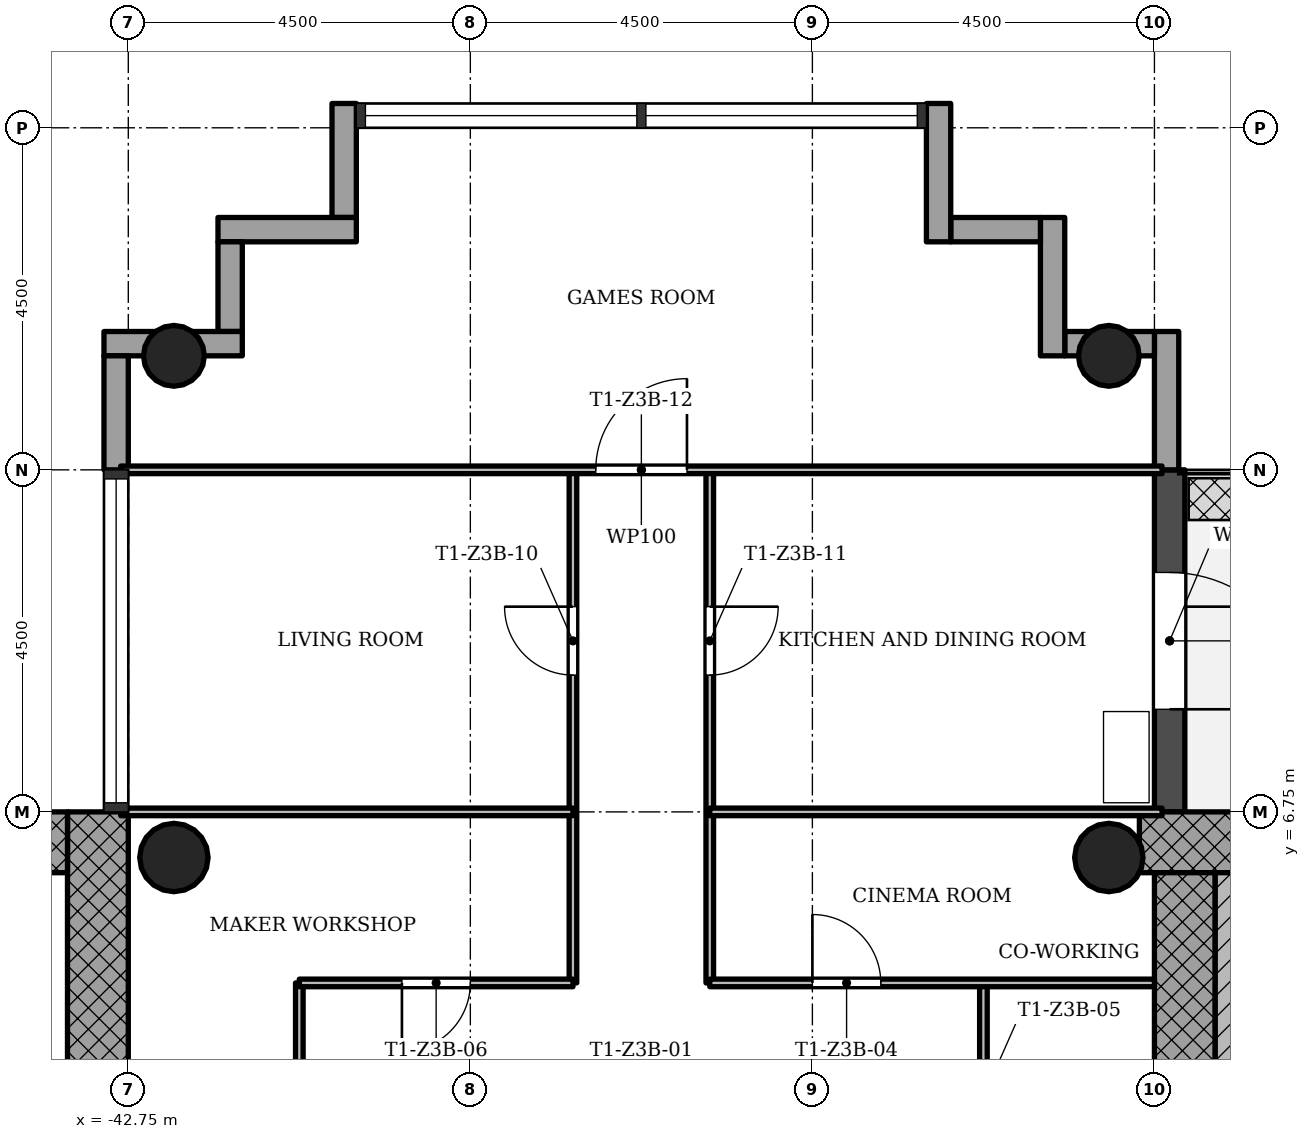
"""IFC4 building model, lengths in metres.
Left out: names, types, materials, properties, quantities, classifications, styles, units other than length and angle.
Written with IfcOpenShell. Run it as: python <this file> out.ifc"""

import sys

from ifc_helpers import new_model, si_unit, direction, frame, frame_2d, origin, origin_2d, place, context, subcontext, project, spatial, rectangle, hollow_circle, extrude, element, fill, save


model = new_model("IFC4")
c1 = context("Model", 3, precision=1e-05, world=origin(), true_north=direction((0.0, 1.0)))
c2 = subcontext(c1, "Body", "Model", "MODEL_VIEW")
j1 = project(units=[si_unit("LENGTHUNIT", "METRE"), si_unit("PLANEANGLEUNIT", "RADIAN")], contexts=[c1])
p1 = place(None, origin())
s1 = spatial("IfcSite", under=j1, at=p1, CompositionType="ELEMENT")
p2 = place(p1, origin())
s2 = spatial("IfcBuilding", under=s1, at=p2, CompositionType="ELEMENT")
p3 = place(p2, frame((0.0, 0.0, 147.3)))
s3 = spatial("IfcBuildingStorey", under=s2, at=p3, CompositionType="ELEMENT", Elevation=147.3)
p4 = place(p3, frame((-20.652, 6.35, 0.0), z_axis=(0.0, 0.0, 1.0), x_axis=(-1.0, 0.0, 0.0)))
e1 = element("IfcWall", 1, at=p4, inside=s3, PredefinedType="SHEAR", context=c2, shape_type="SweptSolid", body=[
    extrude(rectangle(XDim=8.796, YDim=0.8, at=frame_2d((4.398, 0.0))), origin(), (0.0, 0.0, 1.0), 3.4),
])
p5 = place(p3, frame((-28.85, 5.95, 0.0), z_axis=(0.0, 0.0, 1.0), x_axis=(0.0, -1.0, 0.0)))
e2 = element("IfcWall", 2, at=p5, inside=s3, PredefinedType="SHEAR", context=c2, shape_type="SweptSolid", body=[
    extrude(rectangle(XDim=12.7, YDim=0.8, at=frame_2d((6.35, 0.0))), origin(), (0.0, 0.0, 1.0), 3.4),
])
p6 = place(p5, frame((5.05, 0.0, 0.0)))
e3 = element("IfcOpeningElement", 3, at=p6, cuts=e2, PredefinedType="OPENING", context=c2, shape_type="SweptSolid", body=[
    extrude(rectangle(XDim=1.8, YDim=2.1, at=frame_2d((0.9, 1.05))), frame((0.0, 0.41, 0.0), z_axis=(0.0, -1.0, 0.0), x_axis=(1.0, 0.0, 0.0)), (0.0, 0.0, 1.0), 0.82),
])
p7 = place(p3, frame((-43.15, -5.95, 0.0), z_axis=(0.0, 0.0, 1.0), x_axis=(0.0, 1.0, 0.0)))
e4 = element("IfcWall", 4, at=p7, inside=s3, PredefinedType="SHEAR", context=c2, shape_type="SweptSolid", body=[
    extrude(rectangle(XDim=12.7, YDim=0.8, at=frame_2d((6.35, 0.0))), origin(), (0.0, 0.0, 1.0), 3.4),
])
p8 = place(p7, frame((5.05, 0.0, 0.0)))
e5 = element("IfcOpeningElement", 5, at=p8, cuts=e4, PredefinedType="OPENING", context=c2, shape_type="SweptSolid", body=[
    extrude(rectangle(XDim=1.8, YDim=2.1, at=frame_2d((0.9, 1.05))), frame((0.0, 0.41, 0.0), z_axis=(0.0, -1.0, 0.0), x_axis=(1.0, 0.0, 0.0)), (0.0, 0.0, 1.0), 0.82),
])
p9 = place(p3, frame((-43.55, 6.35, 0.0), z_axis=(0.0, 0.0, 1.0), x_axis=(-1.0, 0.0, 0.0)))
e6 = element("IfcWall", 6, at=p9, inside=s3, PredefinedType="SHEAR", context=c2, shape_type="SweptSolid", body=[
    extrude(rectangle(XDim=8.2, YDim=0.8, at=frame_2d((4.1, 0.0))), origin(), (0.0, 0.0, 1.0), 3.4),
])
for number, where, z_axis, x_axis in (
    (7, (-29.85, 12.75, 0.0), (0.0, 0.0, 1.0), (1.0, 0.0, 0.0)),
    (8, (-42.15, 12.75, 0.0), (0.0, 0.0, 1.0), (1.0, 0.0, 0.0)),
):
    element("IfcColumn", number, at=place(p3, frame(where, z_axis=z_axis, x_axis=x_axis)), inside=s3, PredefinedType="COLUMN", context=c2, shape_type="SweptSolid", body=[
        extrude(hollow_circle(Radius=0.4, WallThickness=0.028, at=origin_2d()), origin(), (0.0, 0.0, 1.0), 3.4),
    ])
for number, where, z_axis, x_axis in (
    (9, (-29.85, 6.15, 0.0), (0.0, 0.0, 1.0), (1.0, 0.0, 0.0)),
    (10, (-42.15, 6.15, 0.0), (0.0, 0.0, 1.0), (1.0, 0.0, 0.0)),
):
    element("IfcColumn", number, at=place(p3, frame(where, z_axis=z_axis, x_axis=x_axis)), inside=s3, PredefinedType="COLUMN", context=c2, shape_type="SweptSolid", body=[
        extrude(hollow_circle(Radius=0.45, WallThickness=0.032, at=origin_2d()), origin(), (0.0, 0.0, 1.0), 3.4),
    ])
p10 = place(p3, frame((-29.05, 6.75, -0.02), z_axis=(0.0, 0.0, 1.0), x_axis=(0.0, 1.0, 0.0)))
e11 = element("IfcWall", 11, at=p10, inside=s3, PredefinedType="STANDARD", context=c2, shape_type="SweptSolid", body=[
    extrude(rectangle(XDim=4.5, YDim=0.4, at=frame_2d((2.25, 0.0))), origin(), (0.0, 0.0, 1.0), 3.12),
])
p11 = place(p10, frame((1.35, 0.0, 0.02)))
e12 = element("IfcOpeningElement", 12, at=p11, cuts=e11, PredefinedType="OPENING", context=c2, shape_type="SweptSolid", body=[
    extrude(rectangle(XDim=1.8, YDim=2.1, at=frame_2d((0.9, 1.05))), frame((0.0, 0.21, 0.0), z_axis=(0.0, -1.0, 0.0), x_axis=(1.0, 0.0, 0.0)), (0.0, 0.0, 1.0), 0.42),
])
p12 = place(p3, frame((-29.09, 11.25, -0.3), z_axis=(0.0, 0.0, 1.0), x_axis=(0.0, 1.0, 0.0)))
e13 = element("IfcWall", 13, at=p12, inside=s3, PredefinedType="STANDARD", context=c2, shape_type="SweptSolid", body=[
    extrude(rectangle(XDim=1.82, YDim=0.32, at=frame_2d((0.91, 0.0))), origin(), (0.0, 0.0, 1.0), 3.4),
])
p13 = place(p3, frame((-29.25, 12.91, -0.3), z_axis=(0.0, 0.0, 1.0), x_axis=(-1.0, 0.0, 0.0)))
e14 = element("IfcWall", 14, at=p13, inside=s3, PredefinedType="STANDARD", context=c2, shape_type="SweptSolid", body=[
    extrude(rectangle(XDim=1.18, YDim=0.32, at=frame_2d((0.59, 0.0))), origin(), (0.0, 0.0, 1.0), 3.4),
])
p14 = place(p3, frame((-30.59, 12.75, -0.3), z_axis=(0.0, 0.0, 1.0), x_axis=(0.0, 1.0, 0.0)))
e15 = element("IfcWall", 15, at=p14, inside=s3, PredefinedType="STANDARD", context=c2, shape_type="SweptSolid", body=[
    extrude(rectangle(XDim=1.82, YDim=0.32, at=frame_2d((0.91, 0.0))), origin(), (0.0, 0.0, 1.0), 3.4),
])
p15 = place(p3, frame((-30.75, 14.41, -0.3), z_axis=(0.0, 0.0, 1.0), x_axis=(-1.0, 0.0, 0.0)))
e16 = element("IfcWall", 16, at=p15, inside=s3, PredefinedType="STANDARD", context=c2, shape_type="SweptSolid", body=[
    extrude(rectangle(XDim=1.18, YDim=0.32, at=frame_2d((0.59, 0.0))), origin(), (0.0, 0.0, 1.0), 3.4),
])
p16 = place(p3, frame((-32.09, 14.25, -0.3), z_axis=(0.0, 0.0, 1.0), x_axis=(0.0, 1.0, 0.0)))
e17 = element("IfcWall", 17, at=p16, inside=s3, PredefinedType="STANDARD", context=c2, shape_type="SweptSolid", body=[
    extrude(rectangle(XDim=1.82, YDim=0.32, at=frame_2d((0.91, 0.0))), origin(), (0.0, 0.0, 1.0), 3.4),
])
p17 = place(p3, frame((-39.91, 16.07, -0.3), z_axis=(0.0, 0.0, 1.0), x_axis=(0.0, -1.0, 0.0)))
e18 = element("IfcWall", 18, at=p17, inside=s3, PredefinedType="STANDARD", context=c2, shape_type="SweptSolid", body=[
    extrude(rectangle(XDim=1.5, YDim=0.32, at=frame_2d((0.75, 0.0))), origin(), (0.0, 0.0, 1.0), 3.4),
])
p18 = place(p3, frame((-39.75, 14.41, -0.3), z_axis=(0.0, 0.0, 1.0), x_axis=(-1.0, 0.0, 0.0)))
e19 = element("IfcWall", 19, at=p18, inside=s3, PredefinedType="STANDARD", context=c2, shape_type="SweptSolid", body=[
    extrude(rectangle(XDim=1.82, YDim=0.32, at=frame_2d((0.91, 0.0))), origin(), (0.0, 0.0, 1.0), 3.4),
])
p19 = place(p3, frame((-41.41, 14.25, -0.3), z_axis=(0.0, 0.0, 1.0), x_axis=(0.0, -1.0, 0.0)))
e20 = element("IfcWall", 20, at=p19, inside=s3, PredefinedType="STANDARD", context=c2, shape_type="SweptSolid", body=[
    extrude(rectangle(XDim=1.18, YDim=0.32, at=frame_2d((0.59, 0.0))), origin(), (0.0, 0.0, 1.0), 3.4),
])
p20 = place(p3, frame((-41.25, 12.91, -0.3), z_axis=(0.0, 0.0, 1.0), x_axis=(-1.0, 0.0, 0.0)))
e21 = element("IfcWall", 21, at=p20, inside=s3, PredefinedType="STANDARD", context=c2, shape_type="SweptSolid", body=[
    extrude(rectangle(XDim=1.82, YDim=0.32, at=frame_2d((0.91, 0.0))), origin(), (0.0, 0.0, 1.0), 3.4),
])
p21 = place(p3, frame((-42.91, 12.75, -0.3), z_axis=(0.0, 0.0, 1.0), x_axis=(0.0, -1.0, 0.0)))
e22 = element("IfcWall", 22, at=p21, inside=s3, PredefinedType="STANDARD", context=c2, shape_type="SweptSolid", body=[
    extrude(rectangle(XDim=1.5, YDim=0.32, at=frame_2d((0.75, 0.0))), origin(), (0.0, 0.0, 1.0), 3.4),
])
p22 = place(p3, frame((-40.5, 1.5, 0.0), z_axis=(0.0, 0.0, 1.0), x_axis=(0.0, 1.0, 0.0)))
e23 = element("IfcWall", 23, at=p22, inside=s3, PredefinedType="PARTITIONING", context=c2, shape_type="SweptSolid", body=[
    extrude(rectangle(XDim=3.0, YDim=0.1, at=frame_2d((1.5, 0.0))), origin(), (0.0, 0.0, 1.0), 3.0),
])
p23 = place(p3, frame((-36.9, 4.5, 0.0), z_axis=(0.0, 0.0, 1.0), x_axis=(0.0, 1.0, 0.0)))
e24 = element("IfcWall", 24, at=p23, inside=s3, PredefinedType="PARTITIONING", context=c2, shape_type="SweptSolid", body=[
    extrude(rectangle(XDim=6.75, YDim=0.1, at=frame_2d((3.375, 0.0))), origin(), (0.0, 0.0, 1.0), 3.0),
])
p24 = place(p23, frame((4.05, 0.0, 0.0)))
e25 = element("IfcOpeningElement", 25, at=p24, cuts=e24, PredefinedType="OPENING", context=c2, shape_type="SweptSolid", body=[
    extrude(rectangle(XDim=0.9, YDim=2.1, at=frame_2d((0.45, 1.05))), frame((0.0, 0.06, 0.0), z_axis=(0.0, -1.0, 0.0), x_axis=(1.0, 0.0, 0.0)), (0.0, 0.0, 1.0), 0.12),
])
p25 = place(p3, frame((-35.1, 4.5, 0.0), z_axis=(0.0, 0.0, 1.0), x_axis=(0.0, 1.0, 0.0)))
e26 = element("IfcWall", 26, at=p25, inside=s3, PredefinedType="PARTITIONING", context=c2, shape_type="SweptSolid", body=[
    extrude(rectangle(XDim=6.75, YDim=0.1, at=frame_2d((3.375, 0.0))), origin(), (0.0, 0.0, 1.0), 3.0),
])
p26 = place(p25, frame((4.05, 0.0, 0.0)))
e27 = element("IfcOpeningElement", 27, at=p26, cuts=e26, PredefinedType="OPENING", context=c2, shape_type="SweptSolid", body=[
    extrude(rectangle(XDim=0.9, YDim=2.1, at=frame_2d((0.45, 1.05))), frame((0.0, 0.06, 0.0), z_axis=(0.0, -1.0, 0.0), x_axis=(1.0, 0.0, 0.0)), (0.0, 0.0, 1.0), 0.12),
])
p27 = place(p3, frame((-31.5, 1.5, 0.0), z_axis=(0.0, 0.0, 1.0), x_axis=(0.0, 1.0, 0.0)))
e28 = element("IfcWall", 28, at=p27, inside=s3, PredefinedType="PARTITIONING", context=c2, shape_type="SweptSolid", body=[
    extrude(rectangle(XDim=3.0, YDim=0.1, at=frame_2d((1.5, 0.0))), origin(), (0.0, 0.0, 1.0), 3.0),
])
p28 = place(p27, frame((1.05, 0.0, 0.0)))
e29 = element("IfcOpeningElement", 29, at=p28, cuts=e28, PredefinedType="OPENING", context=c2, shape_type="SweptSolid", body=[
    extrude(rectangle(XDim=0.9, YDim=2.1, at=frame_2d((0.45, 1.05))), frame((0.0, 0.06, 0.0), z_axis=(0.0, -1.0, 0.0), x_axis=(1.0, 0.0, 0.0)), (0.0, 0.0, 1.0), 0.12),
])
p29 = place(p3, frame((-40.5, 4.5, 0.0), z_axis=(0.0, 0.0, 1.0), x_axis=(1.0, 0.0, 0.0)))
e30 = element("IfcWall", 30, at=p29, inside=s3, PredefinedType="PARTITIONING", context=c2, shape_type="SweptSolid", body=[
    extrude(rectangle(XDim=3.6, YDim=0.1, at=frame_2d((1.8, 0.0))), origin(), (0.0, 0.0, 1.0), 3.0),
])
p30 = place(p29, frame((1.35, 0.0, 0.0)))
e31 = element("IfcOpeningElement", 31, at=p30, cuts=e30, PredefinedType="OPENING", context=c2, shape_type="SweptSolid", body=[
    extrude(rectangle(XDim=0.9, YDim=2.1, at=frame_2d((0.45, 1.05))), frame((0.0, 0.06, 0.0), z_axis=(0.0, -1.0, 0.0), x_axis=(1.0, 0.0, 0.0)), (0.0, 0.0, 1.0), 0.12),
])
p31 = place(p3, frame((-35.1, 4.5, 0.0), z_axis=(0.0, 0.0, 1.0), x_axis=(1.0, 0.0, 0.0)))
e32 = element("IfcWall", 32, at=p31, inside=s3, PredefinedType="PARTITIONING", context=c2, shape_type="SweptSolid", body=[
    extrude(rectangle(XDim=5.85, YDim=0.1, at=frame_2d((2.925, 0.0))), origin(), (0.0, 0.0, 1.0), 3.0),
])
p32 = place(p31, frame((1.35, 0.0, 0.0)))
e33 = element("IfcOpeningElement", 33, at=p32, cuts=e32, PredefinedType="OPENING", context=c2, shape_type="SweptSolid", body=[
    extrude(rectangle(XDim=0.9, YDim=2.1, at=frame_2d((0.45, 1.05))), frame((0.0, 0.06, 0.0), z_axis=(0.0, -1.0, 0.0), x_axis=(1.0, 0.0, 0.0)), (0.0, 0.0, 1.0), 0.12),
])
for number, where, z_axis, x_axis in (
    (34, (-42.85, 6.75, 0.0), (0.0, 0.0, 1.0), (1.0, 0.0, 0.0)),
    (35, (-35.1, 6.75, 0.0), (0.0, 0.0, 1.0), (1.0, 0.0, 0.0)),
):
    element("IfcWall", number, at=place(p3, frame(where, z_axis=z_axis, x_axis=x_axis)), inside=s3, PredefinedType="PARTITIONING", context=c2, shape_type="SweptSolid", body=[
        extrude(rectangle(XDim=5.95, YDim=0.1, at=frame_2d((2.975, 0.0))), origin(), (0.0, 0.0, 1.0), 3.0),
    ])
p33 = place(p3, frame((-42.85, 11.25, 0.0), z_axis=(0.0, 0.0, 1.0), x_axis=(1.0, 0.0, 0.0)))
e36 = element("IfcWall", 36, at=p33, inside=s3, PredefinedType="PARTITIONING", context=c2, shape_type="SweptSolid", body=[
    extrude(rectangle(XDim=13.7, YDim=0.1, at=frame_2d((6.85, 0.0))), origin(), (0.0, 0.0, 1.0), 3.0),
])
p34 = place(p33, frame((6.25, 0.0, 0.0)))
e37 = element("IfcOpeningElement", 37, at=p34, cuts=e36, PredefinedType="OPENING", context=c2, shape_type="SweptSolid", body=[
    extrude(rectangle(XDim=1.2, YDim=2.1, at=frame_2d((0.6, 1.05))), frame((0.0, 0.06, 0.0), z_axis=(0.0, -1.0, 0.0), x_axis=(1.0, 0.0, 0.0)), (0.0, 0.0, 1.0), 0.12),
])
p35 = place(p3, frame((-28.25, 1.85, 0.0), z_axis=(0.0, 0.0, 1.0), x_axis=(0.0, 1.0, 0.0)))
e38 = element("IfcWall", 38, at=p35, inside=s3, PredefinedType="SHEAR", context=c2, shape_type="SweptSolid", body=[
    extrude(rectangle(XDim=4.1, YDim=0.4, at=frame_2d((2.05, 0.0))), origin(), (0.0, 0.0, 1.0), 3.4),
])
p36 = place(p11, origin())
e39 = element("IfcDoor", 39, at=p36, inside=s3, OperationType="SINGLE_SWING_LEFT", PredefinedType="DOOR", context=c2, shape_type="SweptSolid", body=[
    extrude(rectangle(XDim=1.8, YDim=2.1, at=frame_2d((0.9, 1.05))), frame((0.0, 0.025, 0.0), z_axis=(0.0, -1.0, 0.0), x_axis=(1.0, 0.0, 0.0)), (0.0, 0.0, 1.0), 0.05),
])
fill(e12, e39)
p37 = place(p32, origin())
e40 = element("IfcDoor", 40, at=p37, inside=s3, OperationType="SINGLE_SWING_RIGHT", PredefinedType="DOOR", context=c2, shape_type="SweptSolid", body=[
    extrude(rectangle(XDim=0.9, YDim=2.1, at=frame_2d((0.45, 1.05))), frame((0.0, 0.025, 0.0), z_axis=(0.0, -1.0, 0.0), x_axis=(1.0, 0.0, 0.0)), (0.0, 0.0, 1.0), 0.05),
])
fill(e33, e40)
p38 = place(p30, origin())
e41 = element("IfcDoor", 41, at=p38, inside=s3, OperationType="SINGLE_SWING_LEFT", PredefinedType="DOOR", context=c2, shape_type="SweptSolid", body=[
    extrude(rectangle(XDim=0.9, YDim=2.1, at=frame_2d((0.45, 1.05))), frame((0.0, 0.025, 0.0), z_axis=(0.0, -1.0, 0.0), x_axis=(1.0, 0.0, 0.0)), (0.0, 0.0, 1.0), 0.05),
])
fill(e31, e41)
p39 = place(p24, origin())
e42 = element("IfcDoor", 42, at=p39, inside=s3, OperationType="SINGLE_SWING_LEFT", PredefinedType="DOOR", context=c2, shape_type="SweptSolid", body=[
    extrude(rectangle(XDim=0.9, YDim=2.1, at=frame_2d((0.45, 1.05))), frame((0.0, 0.025, 0.0), z_axis=(0.0, -1.0, 0.0), x_axis=(1.0, 0.0, 0.0)), (0.0, 0.0, 1.0), 0.05),
])
fill(e25, e42)
p40 = place(p26, origin())
e43 = element("IfcDoor", 43, at=p40, inside=s3, OperationType="SINGLE_SWING_RIGHT", PredefinedType="DOOR", context=c2, shape_type="SweptSolid", body=[
    extrude(rectangle(XDim=0.9, YDim=2.1, at=frame_2d((0.45, 1.05))), frame((0.0, 0.025, 0.0), z_axis=(0.0, -1.0, 0.0), x_axis=(1.0, 0.0, 0.0)), (0.0, 0.0, 1.0), 0.05),
])
fill(e27, e43)
p41 = place(p34, origin())
e44 = element("IfcDoor", 44, at=p41, inside=s3, OperationType="SINGLE_SWING_LEFT", PredefinedType="DOOR", context=c2, shape_type="SweptSolid", body=[
    extrude(rectangle(XDim=1.2, YDim=2.1, at=frame_2d((0.6, 1.05))), frame((0.0, 0.025, 0.0), z_axis=(0.0, -1.0, 0.0), x_axis=(1.0, 0.0, 0.0)), (0.0, 0.0, 1.0), 0.05),
])
fill(e37, e44)
save(model, sys.argv[1])
